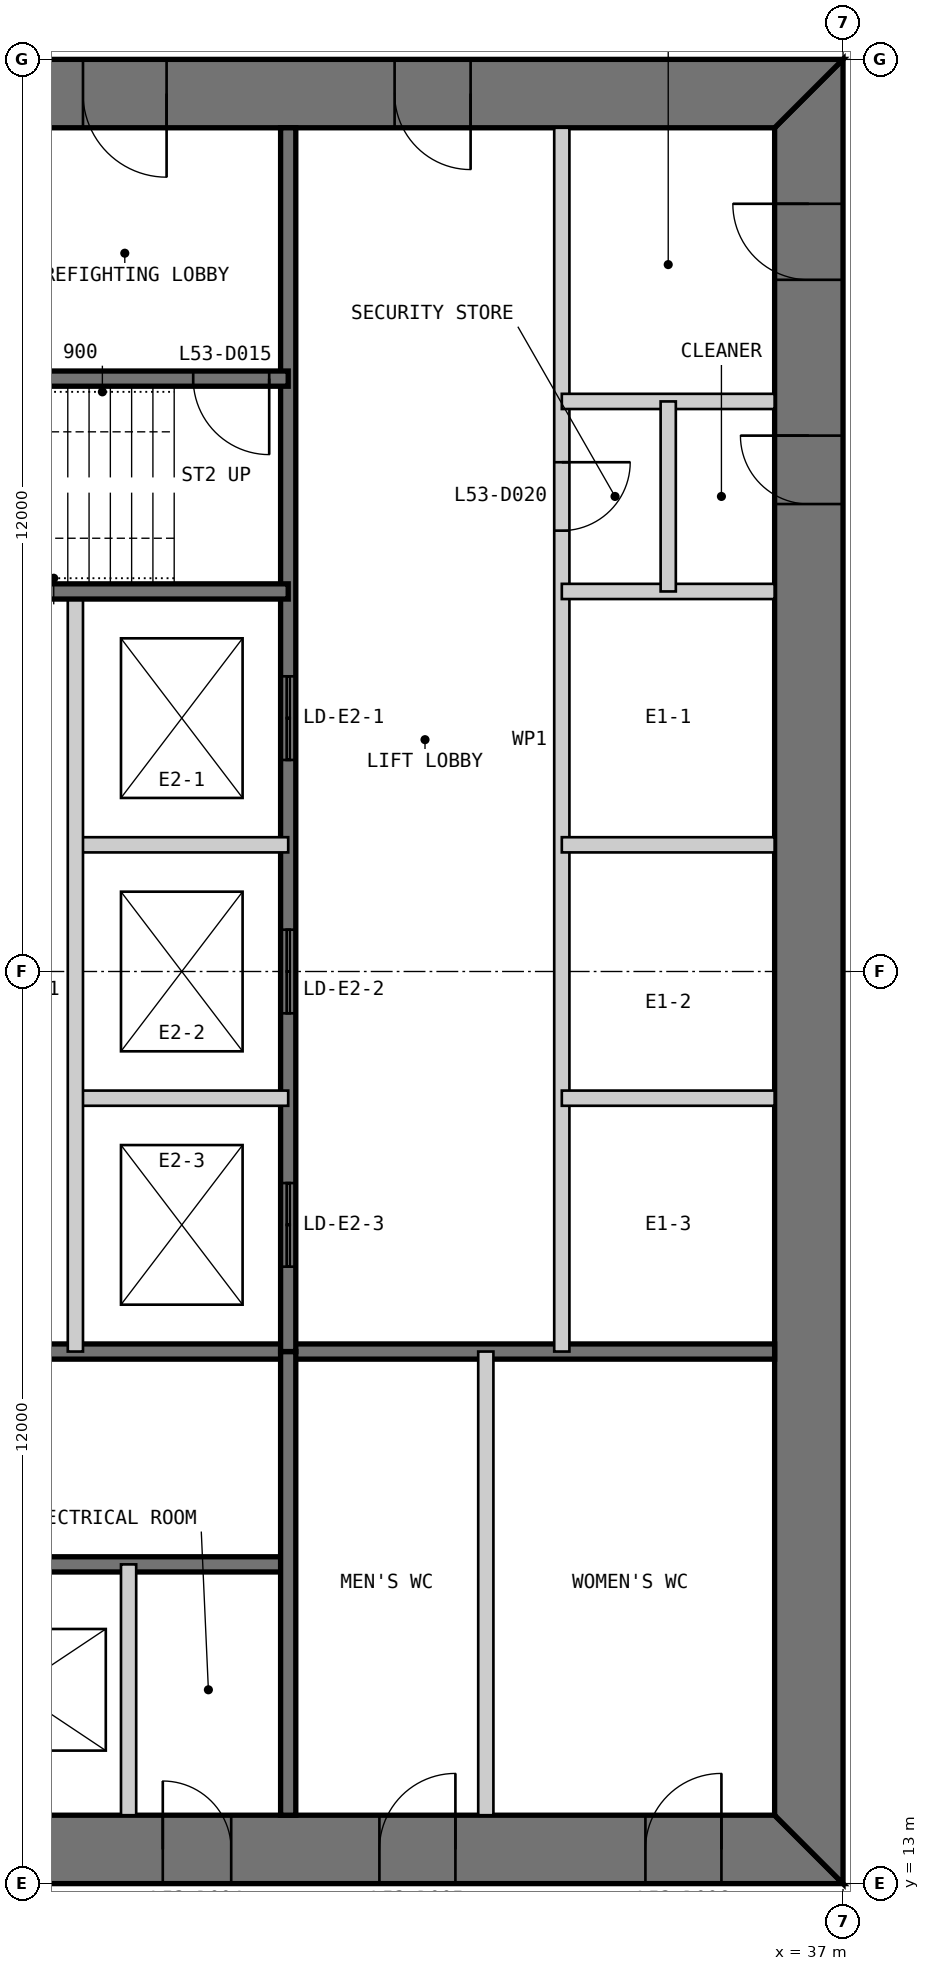
"""IFC4 building model, lengths in metres.
Left out: names, types, materials, properties, quantities, classifications, styles, units other than length and angle.
Written with IfcOpenShell. Run it as: python <this file> out.ifc"""

import sys

from ifc_helpers import new_model, si_unit, direction, frame, frame_2d, origin, place, context, subcontext, project, spatial, polyline, rectangle, outline, extrude, element, fill, save


model = new_model("IFC4")
c1 = context("Model", 3, precision=1e-05, world=origin(), true_north=direction((0.0, 1.0)))
c2 = subcontext(c1, "Body", "Model", "MODEL_VIEW")
j1 = project(units=[si_unit("LENGTHUNIT", "METRE"), si_unit("PLANEANGLEUNIT", "RADIAN")], contexts=[c1])
p1 = place(None, origin())
s1 = spatial("IfcSite", under=j1, at=p1, CompositionType="ELEMENT")
p2 = place(p1, origin())
s2 = spatial("IfcBuilding", under=s1, at=p2, CompositionType="ELEMENT")
p3 = place(p2, frame((0.0, 0.0, 225.8)))
s3 = spatial("IfcBuildingStorey", under=s2, at=p3, CompositionType="ELEMENT", Elevation=225.8)
p4 = place(p3, frame((13.0, 13.45, 0.0), z_axis=(0.0, 0.0, 1.0), x_axis=(1.0, 0.0, 0.0)))
e1 = element("IfcWall", 1, at=p4, inside=s3, PredefinedType="SHEAR", context=c2, shape_type="SweptSolid", body=[
    extrude(outline(polyline([(0.0, -0.45), (24.0, -0.45), (23.1, 0.45), (0.9, 0.45), (0.0, -0.45)])), origin(), (0.0, 0.0, 1.0), 4.0),
])
p5 = place(p4, frame((4.9, 0.0, 0.0)))
e2 = element("IfcOpeningElement", 2, at=p5, cuts=e1, PredefinedType="OPENING", context=c2, shape_type="SweptSolid", body=[
    extrude(rectangle(XDim=1.0, YDim=2.2, at=frame_2d((0.5, 1.1))), frame((0.0, 0.46, 0.0), z_axis=(0.0, -1.0, 0.0), x_axis=(1.0, 0.0, 0.0)), (0.0, 0.0, 1.0), 0.92),
])
p6 = place(p4, frame((8.9, 0.0, 0.0)))
e3 = element("IfcOpeningElement", 3, at=p6, cuts=e1, PredefinedType="OPENING", context=c2, shape_type="SweptSolid", body=[
    extrude(rectangle(XDim=1.1, YDim=2.2, at=frame_2d((0.55, 1.1))), frame((0.0, 0.46, 0.0), z_axis=(0.0, -1.0, 0.0), x_axis=(1.0, 0.0, 0.0)), (0.0, 0.0, 1.0), 0.92),
])
p7 = place(p4, frame((15.05, 0.0, 0.0)))
e4 = element("IfcOpeningElement", 4, at=p7, cuts=e1, PredefinedType="OPENING", context=c2, shape_type="SweptSolid", body=[
    extrude(rectangle(XDim=0.9, YDim=2.2, at=frame_2d((0.45, 1.1))), frame((0.0, 0.46, 0.0), z_axis=(0.0, -1.0, 0.0), x_axis=(1.0, 0.0, 0.0)), (0.0, 0.0, 1.0), 0.92),
])
p8 = place(p4, frame((17.9, 0.0, 0.0)))
e5 = element("IfcOpeningElement", 5, at=p8, cuts=e1, PredefinedType="OPENING", context=c2, shape_type="SweptSolid", body=[
    extrude(rectangle(XDim=1.0, YDim=2.2, at=frame_2d((0.5, 1.1))), frame((0.0, 0.46, 0.0), z_axis=(0.0, -1.0, 0.0), x_axis=(1.0, 0.0, 0.0)), (0.0, 0.0, 1.0), 0.92),
])
p9 = place(p4, frame((21.4, 0.0, 0.0)))
e6 = element("IfcOpeningElement", 6, at=p9, cuts=e1, PredefinedType="OPENING", context=c2, shape_type="SweptSolid", body=[
    extrude(rectangle(XDim=1.0, YDim=2.2, at=frame_2d((0.5, 1.1))), frame((0.0, 0.46, 0.0), z_axis=(0.0, -1.0, 0.0), x_axis=(1.0, 0.0, 0.0)), (0.0, 0.0, 1.0), 0.92),
])
p10 = place(p3, frame((36.55, 13.9, 0.0), z_axis=(0.0, 0.0, 1.0), x_axis=(0.0, 1.0, 0.0)))
e7 = element("IfcWall", 7, at=p10, inside=s3, PredefinedType="SHEAR", context=c2, shape_type="SweptSolid", body=[
    extrude(outline(polyline([(-0.9, -0.45), (23.1, -0.45), (22.2, 0.45), (0.0, 0.45), (-0.9, -0.45)])), origin(), (0.0, 0.0, 1.0), 4.0),
])
p11 = place(p10, frame((20.2, 0.0, 0.0)))
e8 = element("IfcOpeningElement", 8, at=p11, cuts=e7, PredefinedType="OPENING", context=c2, shape_type="SweptSolid", body=[
    extrude(rectangle(XDim=1.0, YDim=2.2, at=frame_2d((0.5, 1.1))), frame((0.0, 0.46, 0.0), z_axis=(0.0, -1.0, 0.0), x_axis=(1.0, 0.0, 0.0)), (0.0, 0.0, 1.0), 0.92),
])
p12 = place(p10, frame((17.25, 0.0, 0.0)))
e9 = element("IfcOpeningElement", 9, at=p12, cuts=e7, PredefinedType="OPENING", context=c2, shape_type="SweptSolid", body=[
    extrude(rectangle(XDim=0.9, YDim=2.2, at=frame_2d((0.45, 1.1))), frame((0.0, 0.46, 0.0), z_axis=(0.0, -1.0, 0.0), x_axis=(1.0, 0.0, 0.0)), (0.0, 0.0, 1.0), 0.92),
])
p13 = place(p3, frame((37.0, 36.55, 0.0), z_axis=(0.0, 0.0, 1.0), x_axis=(-1.0, 0.0, 0.0)))
e10 = element("IfcWall", 10, at=p13, inside=s3, PredefinedType="SHEAR", context=c2, shape_type="SweptSolid", body=[
    extrude(outline(polyline([(0.0, -0.45), (24.0, -0.45), (23.1, 0.45), (0.9, 0.45), (0.0, -0.45)])), origin(), (0.0, 0.0, 1.0), 4.0),
])
p14 = place(p13, frame((4.9, 0.0, 0.0)))
e11 = element("IfcOpeningElement", 11, at=p14, cuts=e10, PredefinedType="OPENING", context=c2, shape_type="SweptSolid", body=[
    extrude(rectangle(XDim=1.0, YDim=2.2, at=frame_2d((0.5, 1.1))), frame((0.0, 0.46, 0.0), z_axis=(0.0, -1.0, 0.0), x_axis=(1.0, 0.0, 0.0)), (0.0, 0.0, 1.0), 0.92),
])
p15 = place(p13, frame((8.9, 0.0, 0.0)))
e12 = element("IfcOpeningElement", 12, at=p15, cuts=e10, PredefinedType="OPENING", context=c2, shape_type="SweptSolid", body=[
    extrude(rectangle(XDim=1.1, YDim=2.2, at=frame_2d((0.55, 1.1))), frame((0.0, 0.46, 0.0), z_axis=(0.0, -1.0, 0.0), x_axis=(1.0, 0.0, 0.0)), (0.0, 0.0, 1.0), 0.92),
])
p16 = place(p13, frame((15.05, 0.0, 0.0)))
e13 = element("IfcOpeningElement", 13, at=p16, cuts=e10, PredefinedType="OPENING", context=c2, shape_type="SweptSolid", body=[
    extrude(rectangle(XDim=0.9, YDim=2.2, at=frame_2d((0.45, 1.1))), frame((0.0, 0.46, 0.0), z_axis=(0.0, -1.0, 0.0), x_axis=(1.0, 0.0, 0.0)), (0.0, 0.0, 1.0), 0.92),
])
p17 = place(p13, frame((17.9, 0.0, 0.0)))
e14 = element("IfcOpeningElement", 14, at=p17, cuts=e10, PredefinedType="OPENING", context=c2, shape_type="SweptSolid", body=[
    extrude(rectangle(XDim=1.0, YDim=2.2, at=frame_2d((0.5, 1.1))), frame((0.0, 0.46, 0.0), z_axis=(0.0, -1.0, 0.0), x_axis=(1.0, 0.0, 0.0)), (0.0, 0.0, 1.0), 0.92),
])
p18 = place(p13, frame((21.4, 0.0, 0.0)))
e15 = element("IfcOpeningElement", 15, at=p18, cuts=e10, PredefinedType="OPENING", context=c2, shape_type="SweptSolid", body=[
    extrude(rectangle(XDim=1.0, YDim=2.2, at=frame_2d((0.5, 1.1))), frame((0.0, 0.46, 0.0), z_axis=(0.0, -1.0, 0.0), x_axis=(1.0, 0.0, 0.0)), (0.0, 0.0, 1.0), 0.92),
])
p19 = place(p3, frame((20.3, 17.2, 0.0), z_axis=(0.0, 0.0, 1.0), x_axis=(1.0, 0.0, 0.0)))
e16 = element("IfcWall", 16, at=p19, inside=s3, PredefinedType="SOLIDWALL", context=c2, shape_type="SweptSolid", body=[
    extrude(rectangle(XDim=9.4, YDim=0.2, at=frame_2d((4.7, 0.0))), origin(), (0.0, 0.0, 1.0), 3.8),
])
p20 = place(p19, frame((0.25, 0.0, 0.0)))
e17 = element("IfcOpeningElement", 17, at=p20, cuts=e16, PredefinedType="OPENING", context=c2, shape_type="SweptSolid", body=[
    extrude(rectangle(XDim=1.0, YDim=2.2, at=frame_2d((0.5, 1.1))), frame((0.0, 0.11, 0.0), z_axis=(0.0, -1.0, 0.0), x_axis=(1.0, 0.0, 0.0)), (0.0, 0.0, 1.0), 0.22),
])
p21 = place(p3, frame((20.3, 20.0, 0.0), z_axis=(0.0, 0.0, 1.0), x_axis=(1.0, 0.0, 0.0)))
e18 = element("IfcWall", 18, at=p21, inside=s3, PredefinedType="SOLIDWALL", context=c2, shape_type="SweptSolid", body=[
    extrude(rectangle(XDim=15.8, YDim=0.2, at=frame_2d((7.9, 0.0))), origin(), (0.0, 0.0, 1.0), 3.8),
])
p22 = place(p3, frame((27.6, 13.9, 0.0), z_axis=(0.0, 0.0, 1.0), x_axis=(0.0, 1.0, 0.0)))
e19 = element("IfcWall", 19, at=p22, inside=s3, PredefinedType="PARTITIONING", context=c2, shape_type="SweptSolid", body=[
    extrude(rectangle(XDim=3.3, YDim=0.2, at=frame_2d((1.65, 0.0))), origin(), (0.0, 0.0, 1.0), 3.8),
])
p23 = place(p3, frame((29.7, 13.9, 0.0), z_axis=(0.0, 0.0, 1.0), x_axis=(0.0, 1.0, 0.0)))
e20 = element("IfcWall", 20, at=p23, inside=s3, PredefinedType="SOLIDWALL", context=c2, shape_type="SweptSolid", body=[
    extrude(rectangle(XDim=6.1, YDim=0.2, at=frame_2d((3.05, 0.0))), origin(), (0.0, 0.0, 1.0), 3.8),
])
p24 = place(p3, frame((32.3, 13.9, 0.0), z_axis=(0.0, 0.0, 1.0), x_axis=(0.0, 1.0, 0.0)))
e21 = element("IfcWall", 21, at=p24, inside=s3, PredefinedType="PARTITIONING", context=c2, shape_type="SweptSolid", body=[
    extrude(rectangle(XDim=6.1, YDim=0.2, at=frame_2d((3.05, 0.0))), origin(), (0.0, 0.0, 1.0), 3.8),
])
p25 = place(p3, frame((33.3, 36.1, 0.0), z_axis=(0.0, 0.0, 1.0), x_axis=(0.0, -1.0, 0.0)))
e22 = element("IfcWall", 22, at=p25, inside=s3, PredefinedType="PARTITIONING", context=c2, shape_type="SweptSolid", body=[
    extrude(rectangle(XDim=16.1, YDim=0.2, at=frame_2d((8.05, 0.0))), origin(), (0.0, 0.0, 1.0), 3.8),
])
p26 = place(p25, frame((4.4, 0.0, 0.0)))
e23 = element("IfcOpeningElement", 23, at=p26, cuts=e22, PredefinedType="OPENING", context=c2, shape_type="SweptSolid", body=[
    extrude(rectangle(XDim=0.9, YDim=2.2, at=frame_2d((0.45, 1.1))), frame((0.0, 0.11, 0.0), z_axis=(0.0, -1.0, 0.0), x_axis=(1.0, 0.0, 0.0)), (0.0, 0.0, 1.0), 0.22),
])
p27 = place(p3, frame((29.7, 36.1, 0.0), z_axis=(0.0, 0.0, 1.0), x_axis=(0.0, -1.0, 0.0)))
e24 = element("IfcWall", 24, at=p27, inside=s3, PredefinedType="SOLIDWALL", context=c2, shape_type="SweptSolid", body=[
    extrude(rectangle(XDim=16.1, YDim=0.2, at=frame_2d((8.05, 0.0))), origin(), (0.0, 0.0, 1.0), 3.8),
])
p28 = place(p27, frame((7.217, 0.0, 0.0)))
e25 = element("IfcOpeningElement", 25, at=p28, cuts=e24, PredefinedType="OPENING", context=c2, shape_type="SweptSolid", body=[
    extrude(rectangle(XDim=1.1, YDim=2.2, at=frame_2d((0.55, 1.1))), frame((0.0, 0.11, 0.0), z_axis=(0.0, -1.0, 0.0), x_axis=(1.0, 0.0, 0.0)), (0.0, 0.0, 1.0), 0.22),
])
p29 = place(p27, frame((10.55, 0.0, 0.0)))
e26 = element("IfcOpeningElement", 26, at=p29, cuts=e24, PredefinedType="OPENING", context=c2, shape_type="SweptSolid", body=[
    extrude(rectangle(XDim=1.1, YDim=2.2, at=frame_2d((0.55, 1.1))), frame((0.0, 0.11, 0.0), z_axis=(0.0, -1.0, 0.0), x_axis=(1.0, 0.0, 0.0)), (0.0, 0.0, 1.0), 0.22),
])
p30 = place(p27, frame((13.883, 0.0, 0.0)))
e27 = element("IfcOpeningElement", 27, at=p30, cuts=e24, PredefinedType="OPENING", context=c2, shape_type="SweptSolid", body=[
    extrude(rectangle(XDim=1.1, YDim=2.2, at=frame_2d((0.55, 1.1))), frame((0.0, 0.11, 0.0), z_axis=(0.0, -1.0, 0.0), x_axis=(1.0, 0.0, 0.0)), (0.0, 0.0, 1.0), 0.22),
])
for number, where, z_axis, x_axis in (
    (28, (36.1, 30.0, 0.0), (0.0, 0.0, 1.0), (-1.0, 0.0, 0.0)),
    (29, (36.1, 26.667, 0.0), (0.0, 0.0, 1.0), (-1.0, 0.0, 0.0)),
    (30, (36.1, 23.333, 0.0), (0.0, 0.0, 1.0), (-1.0, 0.0, 0.0)),
    (31, (29.7, 26.667, 0.0), (0.0, 0.0, 1.0), (-1.0, 0.0, 0.0)),
    (32, (29.7, 23.333, 0.0), (0.0, 0.0, 1.0), (-1.0, 0.0, 0.0)),
):
    element("IfcWall", number, at=place(p3, frame(where, z_axis=z_axis, x_axis=x_axis)), inside=s3, PredefinedType="PARTITIONING", context=c2, shape_type="SweptSolid", body=[
        extrude(rectangle(XDim=2.8, YDim=0.2, at=frame_2d((1.4, 0.0))), origin(), (0.0, 0.0, 1.0), 3.8),
    ])
p31 = place(p3, frame((26.9, 30.0, 0.0), z_axis=(0.0, 0.0, 1.0), x_axis=(0.0, -1.0, 0.0)))
e33 = element("IfcWall", 33, at=p31, inside=s3, PredefinedType="PARTITIONING", context=c2, shape_type="SweptSolid", body=[
    extrude(rectangle(XDim=10.0, YDim=0.2, at=frame_2d((5.0, 0.0))), origin(), (0.0, 0.0, 1.0), 3.8),
])
p32 = place(p3, frame((29.7, 32.8, 0.0), z_axis=(0.0, 0.0, 1.0), x_axis=(-1.0, 0.0, 0.0)))
e34 = element("IfcWall", 34, at=p32, inside=s3, PredefinedType="SOLIDWALL", context=c2, shape_type="SweptSolid", body=[
    extrude(rectangle(XDim=9.4, YDim=0.2, at=frame_2d((4.7, 0.0))), origin(), (0.0, 0.0, 1.0), 3.8),
])
p33 = place(p32, frame((0.25, 0.0, 0.0)))
e35 = element("IfcOpeningElement", 35, at=p33, cuts=e34, PredefinedType="OPENING", context=c2, shape_type="SweptSolid", body=[
    extrude(rectangle(XDim=1.0, YDim=2.2, at=frame_2d((0.5, 1.1))), frame((0.0, 0.11, 0.0), z_axis=(0.0, -1.0, 0.0), x_axis=(1.0, 0.0, 0.0)), (0.0, 0.0, 1.0), 0.22),
])
p34 = place(p3, frame((29.7, 30.0, 0.0), z_axis=(0.0, 0.0, 1.0), x_axis=(-1.0, 0.0, 0.0)))
e36 = element("IfcWall", 36, at=p34, inside=s3, PredefinedType="SOLIDWALL", context=c2, shape_type="SweptSolid", body=[
    extrude(rectangle(XDim=15.8, YDim=0.2, at=frame_2d((7.9, 0.0))), origin(), (0.0, 0.0, 1.0), 3.8),
])
p35 = place(p3, frame((36.1, 32.5, 0.0), z_axis=(0.0, 0.0, 1.0), x_axis=(-1.0, 0.0, 0.0)))
e37 = element("IfcWall", 37, at=p35, inside=s3, PredefinedType="PARTITIONING", context=c2, shape_type="SweptSolid", body=[
    extrude(rectangle(XDim=2.8, YDim=0.2, at=frame_2d((1.4, 0.0))), origin(), (0.0, 0.0, 1.0), 3.8),
])
p36 = place(p3, frame((34.7, 32.5, 0.0), z_axis=(0.0, 0.0, 1.0), x_axis=(0.0, -1.0, 0.0)))
e38 = element("IfcWall", 38, at=p36, inside=s3, PredefinedType="PARTITIONING", context=c2, shape_type="SweptSolid", body=[
    extrude(rectangle(XDim=2.5, YDim=0.2, at=frame_2d((1.25, 0.0))), origin(), (0.0, 0.0, 1.0), 3.8),
])
p37 = place(p7, origin())
e39 = element("IfcDoor", 39, at=p37, inside=s3, OperationType="SINGLE_SWING_LEFT", PredefinedType="DOOR", context=c2, shape_type="SweptSolid", body=[
    extrude(rectangle(XDim=0.9, YDim=2.2, at=frame_2d((0.45, 1.1))), frame((0.0, 0.025, 0.0), z_axis=(0.0, -1.0, 0.0), x_axis=(1.0, 0.0, 0.0)), (0.0, 0.0, 1.0), 0.05),
    extrude(outline(polyline([(0.0, 0.0), (0.04, 0.0), (0.04, 2.16), (0.86, 2.16), (0.86, 0.0), (0.9, 0.0), (0.9, 2.2), (0.0, 2.2), (0.0, 0.0)])), frame((0.0, 0.3, 0.0), z_axis=(0.0, -1.0, 0.0), x_axis=(1.0, 0.0, 0.0)), (0.0, 0.0, 1.0), 0.6),
])
fill(e4, e39)
p38 = place(p8, origin())
e40 = element("IfcDoor", 40, at=p38, inside=s3, OperationType="SINGLE_SWING_RIGHT", PredefinedType="DOOR", context=c2, shape_type="SweptSolid", body=[
    extrude(rectangle(XDim=1.0, YDim=2.2, at=frame_2d((0.5, 1.1))), frame((0.0, 0.025, 0.0), z_axis=(0.0, -1.0, 0.0), x_axis=(1.0, 0.0, 0.0)), (0.0, 0.0, 1.0), 0.05),
    extrude(outline(polyline([(0.0, 0.0), (0.04, 0.0), (0.04, 2.16), (0.96, 2.16), (0.96, 0.0), (1.0, 0.0), (1.0, 2.2), (0.0, 2.2), (0.0, 0.0)])), frame((0.0, 0.3, 0.0), z_axis=(0.0, -1.0, 0.0), x_axis=(1.0, 0.0, 0.0)), (0.0, 0.0, 1.0), 0.6),
])
fill(e5, e40)
p39 = place(p9, origin())
e41 = element("IfcDoor", 41, at=p39, inside=s3, OperationType="SINGLE_SWING_RIGHT", PredefinedType="DOOR", context=c2, shape_type="SweptSolid", body=[
    extrude(rectangle(XDim=1.0, YDim=2.2, at=frame_2d((0.5, 1.1))), frame((0.0, 0.025, 0.0), z_axis=(0.0, -1.0, 0.0), x_axis=(1.0, 0.0, 0.0)), (0.0, 0.0, 1.0), 0.05),
    extrude(outline(polyline([(0.0, 0.0), (0.04, 0.0), (0.04, 2.16), (0.96, 2.16), (0.96, 0.0), (1.0, 0.0), (1.0, 2.2), (0.0, 2.2), (0.0, 0.0)])), frame((0.0, 0.3, 0.0), z_axis=(0.0, -1.0, 0.0), x_axis=(1.0, 0.0, 0.0)), (0.0, 0.0, 1.0), 0.6),
])
fill(e6, e41)
p40 = place(p14, origin())
e42 = element("IfcDoor", 42, at=p40, inside=s3, OperationType="SINGLE_SWING_LEFT", PredefinedType="DOOR", context=c2, shape_type="SweptSolid", body=[
    extrude(rectangle(XDim=1.0, YDim=2.2, at=frame_2d((0.5, 1.1))), frame((0.0, 0.025, 0.0), z_axis=(0.0, -1.0, 0.0), x_axis=(1.0, 0.0, 0.0)), (0.0, 0.0, 1.0), 0.05),
    extrude(outline(polyline([(0.0, 0.0), (0.04, 0.0), (0.04, 2.16), (0.96, 2.16), (0.96, 0.0), (1.0, 0.0), (1.0, 2.2), (0.0, 2.2), (0.0, 0.0)])), frame((0.0, 0.3, 0.0), z_axis=(0.0, -1.0, 0.0), x_axis=(1.0, 0.0, 0.0)), (0.0, 0.0, 1.0), 0.6),
])
fill(e11, e42)
p41 = place(p15, origin())
e43 = element("IfcDoor", 43, at=p41, inside=s3, OperationType="SINGLE_SWING_LEFT", PredefinedType="DOOR", context=c2, shape_type="SweptSolid", body=[
    extrude(rectangle(XDim=1.1, YDim=2.2, at=frame_2d((0.55, 1.1))), frame((0.0, 0.025, 0.0), z_axis=(0.0, -1.0, 0.0), x_axis=(1.0, 0.0, 0.0)), (0.0, 0.0, 1.0), 0.05),
    extrude(outline(polyline([(0.0, 0.0), (0.04, 0.0), (0.04, 2.16), (1.06, 2.16), (1.06, 0.0), (1.1, 0.0), (1.1, 2.2), (0.0, 2.2), (0.0, 0.0)])), frame((0.0, 0.3, 0.0), z_axis=(0.0, -1.0, 0.0), x_axis=(1.0, 0.0, 0.0)), (0.0, 0.0, 1.0), 0.6),
])
fill(e12, e43)
p42 = place(p33, origin())
e44 = element("IfcDoor", 44, at=p42, inside=s3, OperationType="SINGLE_SWING_LEFT", PredefinedType="DOOR", context=c2, shape_type="SweptSolid", body=[
    extrude(rectangle(XDim=1.0, YDim=2.2, at=frame_2d((0.5, 1.1))), frame((0.0, 0.025, 0.0), z_axis=(0.0, -1.0, 0.0), x_axis=(1.0, 0.0, 0.0)), (0.0, 0.0, 1.0), 0.05),
])
fill(e35, e44)
p43 = place(p11, origin())
e45 = element("IfcDoor", 45, at=p43, inside=s3, OperationType="SINGLE_SWING_RIGHT", PredefinedType="DOOR", context=c2, shape_type="SweptSolid", body=[
    extrude(rectangle(XDim=1.0, YDim=2.2, at=frame_2d((0.5, 1.1))), frame((0.0, 0.025, 0.0), z_axis=(0.0, -1.0, 0.0), x_axis=(1.0, 0.0, 0.0)), (0.0, 0.0, 1.0), 0.05),
    extrude(outline(polyline([(0.0, 0.0), (0.04, 0.0), (0.04, 2.16), (0.96, 2.16), (0.96, 0.0), (1.0, 0.0), (1.0, 2.2), (0.0, 2.2), (0.0, 0.0)])), frame((0.0, 0.3, 0.0), z_axis=(0.0, -1.0, 0.0), x_axis=(1.0, 0.0, 0.0)), (0.0, 0.0, 1.0), 0.6),
])
fill(e8, e45)
p44 = place(p26, origin())
e46 = element("IfcDoor", 46, at=p44, inside=s3, OperationType="SINGLE_SWING_LEFT", PredefinedType="DOOR", context=c2, shape_type="SweptSolid", body=[
    extrude(rectangle(XDim=0.9, YDim=2.2, at=frame_2d((0.45, 1.1))), frame((0.0, 0.025, 0.0), z_axis=(0.0, -1.0, 0.0), x_axis=(1.0, 0.0, 0.0)), (0.0, 0.0, 1.0), 0.05),
])
fill(e23, e46)
p45 = place(p12, origin())
e47 = element("IfcDoor", 47, at=p45, inside=s3, OperationType="SINGLE_SWING_RIGHT", PredefinedType="DOOR", context=c2, shape_type="SweptSolid", body=[
    extrude(rectangle(XDim=0.9, YDim=2.2, at=frame_2d((0.45, 1.1))), frame((0.0, 0.025, 0.0), z_axis=(0.0, -1.0, 0.0), x_axis=(1.0, 0.0, 0.0)), (0.0, 0.0, 1.0), 0.05),
    extrude(outline(polyline([(0.0, 0.0), (0.04, 0.0), (0.04, 2.16), (0.86, 2.16), (0.86, 0.0), (0.9, 0.0), (0.9, 2.2), (0.0, 2.2), (0.0, 0.0)])), frame((0.0, 0.3, 0.0), z_axis=(0.0, -1.0, 0.0), x_axis=(1.0, 0.0, 0.0)), (0.0, 0.0, 1.0), 0.6),
])
fill(e9, e47)
p46 = place(p28, origin())
e48 = element("IfcDoor", 48, at=p46, inside=s3, OperationType="DOUBLE_DOOR_SLIDING", PredefinedType="DOOR", context=c2, shape_type="SweptSolid", body=[
    extrude(rectangle(XDim=1.1, YDim=2.2, at=frame_2d((0.55, 1.1))), frame((0.0, 0.025, 0.0), z_axis=(0.0, -1.0, 0.0), x_axis=(1.0, 0.0, 0.0)), (0.0, 0.0, 1.0), 0.05),
])
fill(e25, e48)
p47 = place(p29, origin())
e49 = element("IfcDoor", 49, at=p47, inside=s3, OperationType="DOUBLE_DOOR_SLIDING", PredefinedType="DOOR", context=c2, shape_type="SweptSolid", body=[
    extrude(rectangle(XDim=1.1, YDim=2.2, at=frame_2d((0.55, 1.1))), frame((0.0, 0.025, 0.0), z_axis=(0.0, -1.0, 0.0), x_axis=(1.0, 0.0, 0.0)), (0.0, 0.0, 1.0), 0.05),
])
fill(e26, e49)
p48 = place(p30, origin())
e50 = element("IfcDoor", 50, at=p48, inside=s3, OperationType="DOUBLE_DOOR_SLIDING", PredefinedType="DOOR", context=c2, shape_type="SweptSolid", body=[
    extrude(rectangle(XDim=1.1, YDim=2.2, at=frame_2d((0.55, 1.1))), frame((0.0, 0.025, 0.0), z_axis=(0.0, -1.0, 0.0), x_axis=(1.0, 0.0, 0.0)), (0.0, 0.0, 1.0), 0.05),
])
fill(e27, e50)
save(model, sys.argv[1])
